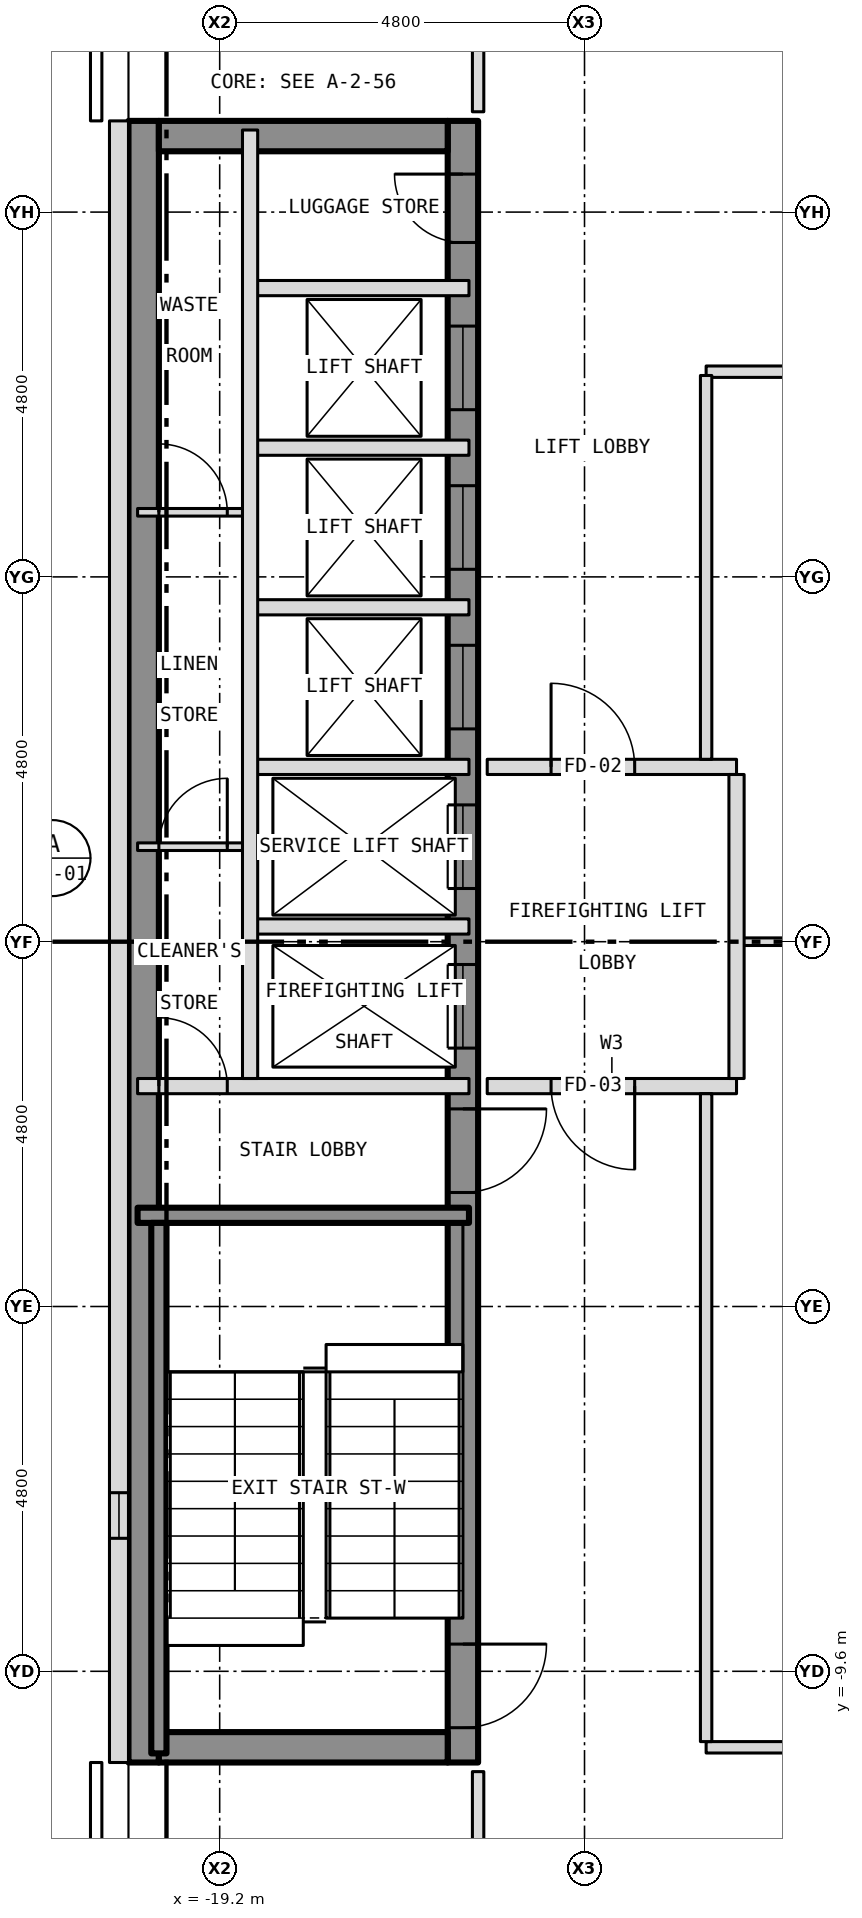
"""IFC4 building model, lengths in metres.
Left out: names, types, materials, properties, quantities, classifications, styles, units other than length and angle.
Written with IfcOpenShell. Run it as: python <this file> out.ifc"""

import sys

from ifc_helpers import new_model, si_unit, direction, frame, frame_2d, origin, place, context, subcontext, project, spatial, rectangle, extrude, element, fill, save


model = new_model("IFC4")
c1 = context("Model", 3, precision=1e-05, world=origin(), true_north=direction((0.0, 1.0)))
c2 = subcontext(c1, "Body", "Model", "MODEL_VIEW")
j1 = project(units=[si_unit("LENGTHUNIT", "METRE"), si_unit("PLANEANGLEUNIT", "RADIAN")], contexts=[c1])
p1 = place(None, origin())
s1 = spatial("IfcSite", under=j1, at=p1, CompositionType="ELEMENT")
p2 = place(p1, origin())
s2 = spatial("IfcBuilding", under=s1, at=p2, CompositionType="ELEMENT")
p3 = place(p2, frame((0.0, 0.0, 205.0)))
s3 = spatial("IfcBuildingStorey", under=s2, at=p3, CompositionType="ELEMENT", Elevation=205.0)
p4 = place(p3, frame((-16.0, -10.8, 0.0), z_axis=(0.0, 0.0, 1.0), x_axis=(0.0, 1.0, 0.0)))
e1 = element("IfcWall", 1, at=p4, inside=s3, PredefinedType="SHEAR", context=c2, shape_type="SweptSolid", body=[
    extrude(rectangle(XDim=21.6, YDim=0.4, at=frame_2d((10.8, 0.0))), origin(), (0.0, 0.0, 1.0), 3.25),
])
p5 = place(p4, frame((9.4, 0.0, 0.0)))
e2 = element("IfcOpeningElement", 2, at=p5, cuts=e1, PredefinedType="OPENING", context=c2, shape_type="SweptSolid", body=[
    extrude(rectangle(XDim=1.1, YDim=2.1, at=frame_2d((0.55, 1.05))), frame((0.0, 0.212, 0.0), z_axis=(0.0, -1.0, 0.0), x_axis=(1.0, 0.0, 0.0)), (0.0, 0.0, 1.0), 0.424),
])
p6 = place(p4, frame((11.5, 0.0, 0.0)))
e3 = element("IfcOpeningElement", 3, at=p6, cuts=e1, PredefinedType="OPENING", context=c2, shape_type="SweptSolid", body=[
    extrude(rectangle(XDim=1.1, YDim=2.1, at=frame_2d((0.55, 1.05))), frame((0.0, 0.212, 0.0), z_axis=(0.0, -1.0, 0.0), x_axis=(1.0, 0.0, 0.0)), (0.0, 0.0, 1.0), 0.424),
])
p7 = place(p4, frame((13.6, 0.0, 0.0)))
e4 = element("IfcOpeningElement", 4, at=p7, cuts=e1, PredefinedType="OPENING", context=c2, shape_type="SweptSolid", body=[
    extrude(rectangle(XDim=1.1, YDim=2.1, at=frame_2d((0.55, 1.05))), frame((0.0, 0.212, 0.0), z_axis=(0.0, -1.0, 0.0), x_axis=(1.0, 0.0, 0.0)), (0.0, 0.0, 1.0), 0.424),
])
p8 = place(p4, frame((15.7, 0.0, 0.0)))
e5 = element("IfcOpeningElement", 5, at=p8, cuts=e1, PredefinedType="OPENING", context=c2, shape_type="SweptSolid", body=[
    extrude(rectangle(XDim=1.1, YDim=2.1, at=frame_2d((0.55, 1.05))), frame((0.0, 0.212, 0.0), z_axis=(0.0, -1.0, 0.0), x_axis=(1.0, 0.0, 0.0)), (0.0, 0.0, 1.0), 0.424),
])
p9 = place(p4, frame((17.8, 0.0, 0.0)))
e6 = element("IfcOpeningElement", 6, at=p9, cuts=e1, PredefinedType="OPENING", context=c2, shape_type="SweptSolid", body=[
    extrude(rectangle(XDim=1.1, YDim=2.1, at=frame_2d((0.55, 1.05))), frame((0.0, 0.212, 0.0), z_axis=(0.0, -1.0, 0.0), x_axis=(1.0, 0.0, 0.0)), (0.0, 0.0, 1.0), 0.424),
])
p10 = place(p4, frame((0.458, 0.0, 0.0)))
e7 = element("IfcOpeningElement", 7, at=p10, cuts=e1, PredefinedType="OPENING", context=c2, shape_type="SweptSolid", body=[
    extrude(rectangle(XDim=1.1, YDim=2.1, at=frame_2d((0.55, 1.05))), frame((0.0, 0.212, 0.0), z_axis=(0.0, -1.0, 0.0), x_axis=(1.0, 0.0, 0.0)), (0.0, 0.0, 1.0), 0.424),
])
p11 = place(p4, frame((7.5, 0.0, 0.0)))
e8 = element("IfcOpeningElement", 8, at=p11, cuts=e1, PredefinedType="OPENING", context=c2, shape_type="SweptSolid", body=[
    extrude(rectangle(XDim=1.1, YDim=2.1, at=frame_2d((0.55, 1.05))), frame((0.0, 0.212, 0.0), z_axis=(0.0, -1.0, 0.0), x_axis=(1.0, 0.0, 0.0)), (0.0, 0.0, 1.0), 0.424),
])
p12 = place(p4, frame((20.0, 0.0, 0.0)))
e9 = element("IfcOpeningElement", 9, at=p12, cuts=e1, PredefinedType="OPENING", context=c2, shape_type="SweptSolid", body=[
    extrude(rectangle(XDim=0.9, YDim=2.1, at=frame_2d((0.45, 1.05))), frame((0.0, 0.212, 0.0), z_axis=(0.0, -1.0, 0.0), x_axis=(1.0, 0.0, 0.0)), (0.0, 0.0, 1.0), 0.424),
])
p13 = place(p3, frame((-20.2, -10.8, 0.0), z_axis=(0.0, 0.0, 1.0), x_axis=(0.0, 1.0, 0.0)))
e10 = element("IfcWall", 10, at=p13, inside=s3, PredefinedType="SHEAR", context=c2, shape_type="SweptSolid", body=[
    extrude(rectangle(XDim=21.6, YDim=0.4, at=frame_2d((10.8, 0.0))), origin(), (0.0, 0.0, 1.0), 3.25),
])
for number, where, z_axis, x_axis in (
    (11, (-20.0, 10.6, 0.0), (0.0, 0.0, 1.0), (1.0, 0.0, 0.0)),
    (12, (-20.0, -10.6, 0.0), (0.0, 0.0, 1.0), (1.0, 0.0, 0.0)),
):
    element("IfcWall", number, at=place(p3, frame(where, z_axis=z_axis, x_axis=x_axis)), inside=s3, PredefinedType="SHEAR", context=c2, shape_type="SweptSolid", body=[
        extrude(rectangle(XDim=3.8, YDim=0.4, at=frame_2d((1.9, 0.0))), origin(), (0.0, 0.0, 1.0), 3.25),
    ])
p14 = place(p3, frame((-20.525, 10.8, 0.0), z_axis=(0.0, 0.0, 1.0), x_axis=(0.0, -1.0, 0.0)))
e13 = element("IfcWall", 13, at=p14, inside=s3, PredefinedType="SOLIDWALL", context=c2, shape_type="SweptSolid", body=[
    extrude(rectangle(XDim=21.6, YDim=0.25, at=frame_2d((10.8, 0.0))), origin(), (0.0, 0.0, 1.0), 3.5),
])
p15 = place(p14, frame((18.05, 0.0, 1.0)))
e14 = element("IfcOpeningElement", 14, at=p15, cuts=e13, PredefinedType="OPENING", context=c2, shape_type="SweptSolid", body=[
    extrude(rectangle(XDim=0.6, YDim=1.5, at=frame_2d((0.3, 0.75))), frame((0.0, 0.137, 0.0), z_axis=(0.0, -1.0, 0.0), x_axis=(1.0, 0.0, 0.0)), (0.0, 0.0, 1.0), 0.274),
])
p16 = place(p3, frame((-12.8, -10.6, 0.0), z_axis=(0.0, 0.0, 1.0), x_axis=(1.0, 0.0, 0.0)))
e15 = element("IfcWall", 15, at=p16, inside=s3, PredefinedType="PARTITIONING", context=c2, shape_type="SweptSolid", body=[
    extrude(rectangle(XDim=16.9, YDim=0.15, at=frame_2d((8.45, 0.0))), origin(), (0.0, 0.0, 1.0), 3.35),
])
p17 = place(p16, frame((5.95, 0.0, 0.0)))
e16 = element("IfcOpeningElement", 16, at=p17, cuts=e15, PredefinedType="OPENING", context=c2, shape_type="SweptSolid", body=[
    extrude(rectangle(XDim=0.9, YDim=2.1, at=frame_2d((0.45, 1.05))), frame((0.0, 0.087, 0.0), z_axis=(0.0, -1.0, 0.0), x_axis=(1.0, 0.0, 0.0)), (0.0, 0.0, 1.0), 0.174),
])
p18 = place(p3, frame((-20.28, -3.6, 0.0), z_axis=(0.0, 0.0, 1.0), x_axis=(1.0, 0.0, 0.0)))
e17 = element("IfcWall", 17, at=p18, inside=s3, PredefinedType="SHEAR", context=c2, shape_type="SweptSolid", body=[
    extrude(rectangle(XDim=4.36, YDim=0.2, at=frame_2d((2.18, 0.0))), origin(), (0.0, 0.0, 1.0), 3.25),
])
p19 = place(p3, frame((-20.28, -1.9, 0.0), z_axis=(0.0, 0.0, 1.0), x_axis=(1.0, 0.0, 0.0)))
e18 = element("IfcWall", 18, at=p19, inside=s3, PredefinedType="PARTITIONING", context=c2, shape_type="SweptSolid", body=[
    extrude(rectangle(XDim=4.36, YDim=0.2, at=frame_2d((2.18, 0.0))), origin(), (0.0, 0.0, 1.0), 3.25),
])
p20 = place(p19, frame((0.28, 0.0, 0.0)))
e19 = element("IfcOpeningElement", 19, at=p20, cuts=e18, PredefinedType="OPENING", context=c2, shape_type="SweptSolid", body=[
    extrude(rectangle(XDim=0.9, YDim=2.1, at=frame_2d((0.45, 1.05))), frame((0.0, 0.112, 0.0), z_axis=(0.0, -1.0, 0.0), x_axis=(1.0, 0.0, 0.0)), (0.0, 0.0, 1.0), 0.224),
])
p21 = place(p3, frame((-15.68, -1.9, 0.0), z_axis=(0.0, 0.0, 1.0), x_axis=(1.0, 0.0, 0.0)))
e20 = element("IfcWall", 20, at=p21, inside=s3, PredefinedType="PARTITIONING", context=c2, shape_type="SweptSolid", body=[
    extrude(rectangle(XDim=3.28, YDim=0.2, at=frame_2d((1.64, 0.0))), origin(), (0.0, 0.0, 1.0), 3.35),
])
p22 = place(p21, frame((0.84, 0.0, 0.0)))
e21 = element("IfcOpeningElement", 21, at=p22, cuts=e20, PredefinedType="OPENING", context=c2, shape_type="SweptSolid", body=[
    extrude(rectangle(XDim=1.1, YDim=2.1, at=frame_2d((0.55, 1.05))), frame((0.0, 0.112, 0.0), z_axis=(0.0, -1.0, 0.0), x_axis=(1.0, 0.0, 0.0)), (0.0, 0.0, 1.0), 0.224),
])
p23 = place(p3, frame((-12.4, 0.0, 0.0), z_axis=(0.0, 0.0, 1.0), x_axis=(1.0, 0.0, 0.0)))
e22 = element("IfcWall", 22, at=p23, inside=s3, PredefinedType="PARTITIONING", context=c2, shape_type="SweptSolid", body=[
    extrude(rectangle(XDim=2.613, YDim=0.1, at=frame_2d((1.306, 0.0))), origin(), (0.0, 0.0, 1.0), 2.728),
])
p24 = place(p3, frame((-18.8, 0.2, 0.0), z_axis=(0.0, 0.0, 1.0), x_axis=(1.0, 0.0, 0.0)))
e23 = element("IfcWall", 23, at=p24, inside=s3, PredefinedType="PARTITIONING", context=c2, shape_type="SweptSolid", body=[
    extrude(rectangle(XDim=2.88, YDim=0.2, at=frame_2d((1.44, 0.0))), origin(), (0.0, 0.0, 1.0), 3.25),
])
p25 = place(p3, frame((-20.28, 1.25, 0.0), z_axis=(0.0, 0.0, 1.0), x_axis=(1.0, 0.0, 0.0)))
e24 = element("IfcWall", 24, at=p25, inside=s3, PredefinedType="PARTITIONING", context=c2, shape_type="SweptSolid", body=[
    extrude(rectangle(XDim=1.48, YDim=0.1, at=frame_2d((0.74, 0.0))), origin(), (0.0, 0.0, 1.0), 3.25),
])
p26 = place(p25, frame((0.28, 0.0, 0.0)))
e25 = element("IfcOpeningElement", 25, at=p26, cuts=e24, PredefinedType="OPENING", context=c2, shape_type="SweptSolid", body=[
    extrude(rectangle(XDim=0.9, YDim=2.1, at=frame_2d((0.45, 1.05))), frame((0.0, 0.062, 0.0), z_axis=(0.0, -1.0, 0.0), x_axis=(1.0, 0.0, 0.0)), (0.0, 0.0, 1.0), 0.124),
])
p27 = place(p3, frame((-18.8, 2.3, 0.0), z_axis=(0.0, 0.0, 1.0), x_axis=(1.0, 0.0, 0.0)))
e26 = element("IfcWall", 26, at=p27, inside=s3, PredefinedType="PARTITIONING", context=c2, shape_type="SweptSolid", body=[
    extrude(rectangle(XDim=2.88, YDim=0.2, at=frame_2d((1.44, 0.0))), origin(), (0.0, 0.0, 1.0), 3.25),
])
p28 = place(p3, frame((-15.68, 2.3, 0.0), z_axis=(0.0, 0.0, 1.0), x_axis=(1.0, 0.0, 0.0)))
e27 = element("IfcWall", 27, at=p28, inside=s3, PredefinedType="PARTITIONING", context=c2, shape_type="SweptSolid", body=[
    extrude(rectangle(XDim=3.28, YDim=0.2, at=frame_2d((1.64, 0.0))), origin(), (0.0, 0.0, 1.0), 3.35),
])
p29 = place(p28, frame((0.84, 0.0, 0.0)))
e28 = element("IfcOpeningElement", 28, at=p29, cuts=e27, PredefinedType="OPENING", context=c2, shape_type="SweptSolid", body=[
    extrude(rectangle(XDim=1.1, YDim=2.1, at=frame_2d((0.55, 1.05))), frame((0.0, 0.112, 0.0), z_axis=(0.0, -1.0, 0.0), x_axis=(1.0, 0.0, 0.0)), (0.0, 0.0, 1.0), 0.224),
])
p30 = place(p3, frame((-18.8, 4.4, 0.0), z_axis=(0.0, 0.0, 1.0), x_axis=(1.0, 0.0, 0.0)))
e29 = element("IfcWall", 29, at=p30, inside=s3, PredefinedType="PARTITIONING", context=c2, shape_type="SweptSolid", body=[
    extrude(rectangle(XDim=2.88, YDim=0.2, at=frame_2d((1.44, 0.0))), origin(), (0.0, 0.0, 1.0), 3.25),
])
p31 = place(p3, frame((-20.28, 5.65, 0.0), z_axis=(0.0, 0.0, 1.0), x_axis=(1.0, 0.0, 0.0)))
e30 = element("IfcWall", 30, at=p31, inside=s3, PredefinedType="PARTITIONING", context=c2, shape_type="SweptSolid", body=[
    extrude(rectangle(XDim=1.48, YDim=0.1, at=frame_2d((0.74, 0.0))), origin(), (0.0, 0.0, 1.0), 3.25),
])
p32 = place(p31, frame((0.28, 0.0, 0.0)))
e31 = element("IfcOpeningElement", 31, at=p32, cuts=e30, PredefinedType="OPENING", context=c2, shape_type="SweptSolid", body=[
    extrude(rectangle(XDim=0.9, YDim=2.1, at=frame_2d((0.45, 1.05))), frame((0.0, 0.062, 0.0), z_axis=(0.0, -1.0, 0.0), x_axis=(1.0, 0.0, 0.0)), (0.0, 0.0, 1.0), 0.124),
])
p33 = place(p3, frame((-18.8, 6.5, 0.0), z_axis=(0.0, 0.0, 1.0), x_axis=(1.0, 0.0, 0.0)))
e32 = element("IfcWall", 32, at=p33, inside=s3, PredefinedType="PARTITIONING", context=c2, shape_type="SweptSolid", body=[
    extrude(rectangle(XDim=2.88, YDim=0.2, at=frame_2d((1.44, 0.0))), origin(), (0.0, 0.0, 1.0), 3.25),
])
p34 = place(p3, frame((-12.8, 7.5, 0.0), z_axis=(0.0, 0.0, 1.0), x_axis=(1.0, 0.0, 0.0)))
e33 = element("IfcWall", 33, at=p34, inside=s3, PredefinedType="PARTITIONING", context=c2, shape_type="SweptSolid", body=[
    extrude(rectangle(XDim=16.9, YDim=0.15, at=frame_2d((8.45, 0.0))), origin(), (0.0, 0.0, 1.0), 3.35),
])
p35 = place(p34, frame((14.4, 0.0, 0.0)))
e34 = element("IfcOpeningElement", 34, at=p35, cuts=e33, PredefinedType="OPENING", context=c2, shape_type="SweptSolid", body=[
    extrude(rectangle(XDim=0.9, YDim=2.1, at=frame_2d((0.45, 1.05))), frame((0.0, 0.087, 0.0), z_axis=(0.0, -1.0, 0.0), x_axis=(1.0, 0.0, 0.0)), (0.0, 0.0, 1.0), 0.174),
])
p36 = place(p34, frame((5.95, 0.0, 0.0)))
e35 = element("IfcOpeningElement", 35, at=p36, cuts=e33, PredefinedType="OPENING", context=c2, shape_type="SweptSolid", body=[
    extrude(rectangle(XDim=0.9, YDim=2.1, at=frame_2d((0.45, 1.05))), frame((0.0, 0.087, 0.0), z_axis=(0.0, -1.0, 0.0), x_axis=(1.0, 0.0, 0.0)), (0.0, 0.0, 1.0), 0.174),
])
p37 = place(p3, frame((-18.8, 8.6, 0.0), z_axis=(0.0, 0.0, 1.0), x_axis=(1.0, 0.0, 0.0)))
e36 = element("IfcWall", 36, at=p37, inside=s3, PredefinedType="PARTITIONING", context=c2, shape_type="SweptSolid", body=[
    extrude(rectangle(XDim=2.88, YDim=0.2, at=frame_2d((1.44, 0.0))), origin(), (0.0, 0.0, 1.0), 3.25),
])
p38 = place(p3, frame((-20.0, -10.68, 0.0), z_axis=(0.0, 0.0, 1.0), x_axis=(0.0, 1.0, 0.0)))
e37 = element("IfcWall", 37, at=p38, inside=s3, PredefinedType="SHEAR", context=c2, shape_type="SweptSolid", body=[
    extrude(rectangle(XDim=6.98, YDim=0.2, at=frame_2d((3.49, 0.0))), origin(), (0.0, 0.0, 1.0), 3.25),
])
p39 = place(p3, frame((-18.8, -1.8, 0.0), z_axis=(0.0, 0.0, 1.0), x_axis=(0.0, 1.0, 0.0)))
e38 = element("IfcWall", 38, at=p39, inside=s3, PredefinedType="PARTITIONING", context=c2, shape_type="SweptSolid", body=[
    extrude(rectangle(XDim=12.48, YDim=0.2, at=frame_2d((6.24, 0.0))), origin(), (0.0, 0.0, 1.0), 3.25),
])
for number, where, z_axis, x_axis in (
    (39, (-15.8, -12.725, 0.0), (0.0, 0.0, 1.0), (0.0, 1.0, 0.0)),
    (40, (-15.8, 10.92, 0.0), (0.0, 0.0, 1.0), (0.0, 1.0, 0.0)),
):
    element("IfcWall", number, at=place(p3, frame(where, z_axis=z_axis, x_axis=x_axis)), inside=s3, PredefinedType="PARTITIONING", context=c2, shape_type="SweptSolid", body=[
        extrude(rectangle(XDim=1.805, YDim=0.15, at=frame_2d((0.903, 0.0))), origin(), (0.0, 0.0, 1.0), 3.35),
    ])
p40 = place(p3, frame((-12.8, -10.525, 0.0), z_axis=(0.0, 0.0, 1.0), x_axis=(0.0, 1.0, 0.0)))
e41 = element("IfcWall", 41, at=p40, inside=s3, PredefinedType="PARTITIONING", context=c2, shape_type="SweptSolid", body=[
    extrude(rectangle(XDim=8.525, YDim=0.15, at=frame_2d((4.262, 0.0))), origin(), (0.0, 0.0, 1.0), 3.35),
])
p41 = place(p3, frame((-12.8, 2.4, 0.0), z_axis=(0.0, 0.0, 1.0), x_axis=(0.0, 1.0, 0.0)))
e42 = element("IfcWall", 42, at=p41, inside=s3, PredefinedType="PARTITIONING", context=c2, shape_type="SweptSolid", body=[
    extrude(rectangle(XDim=5.05, YDim=0.15, at=frame_2d((2.525, 0.0))), origin(), (0.0, 0.0, 1.0), 3.35),
])
p42 = place(p3, frame((-12.4, -1.8, 0.0), z_axis=(0.0, 0.0, 1.0), x_axis=(0.0, 1.0, 0.0)))
e43 = element("IfcWall", 43, at=p42, inside=s3, PredefinedType="PARTITIONING", context=c2, shape_type="SweptSolid", body=[
    extrude(rectangle(XDim=4.0, YDim=0.2, at=frame_2d((2.0, 0.0))), origin(), (0.0, 0.0, 1.0), 3.35),
])
p43 = place(p15, origin())
e44 = element("IfcWindow", 44, at=p43, inside=s3, PartitioningType="SINGLE_PANEL", PredefinedType="WINDOW", context=c2, shape_type="SweptSolid", body=[
    extrude(rectangle(XDim=0.6, YDim=1.5, at=frame_2d((0.3, 0.75))), frame((0.0, -0.035, 0.0), z_axis=(0.0, -1.0, 0.0), x_axis=(1.0, 0.0, 0.0)), (0.0, 0.0, 1.0), 0.06),
])
fill(e14, e44)
p44 = place(p5, origin())
e45 = element("IfcDoor", 45, at=p44, inside=s3, OperationType="SLIDING_TO_LEFT", PredefinedType="DOOR", context=c2, shape_type="SweptSolid", body=[
    extrude(rectangle(XDim=1.1, YDim=2.1, at=frame_2d((0.55, 1.05))), frame((0.0, 0.025, 0.0), z_axis=(0.0, -1.0, 0.0), x_axis=(1.0, 0.0, 0.0)), (0.0, 0.0, 1.0), 0.05),
])
fill(e2, e45)
p45 = place(p6, origin())
e46 = element("IfcDoor", 46, at=p45, inside=s3, OperationType="SLIDING_TO_LEFT", PredefinedType="DOOR", context=c2, shape_type="SweptSolid", body=[
    extrude(rectangle(XDim=1.1, YDim=2.1, at=frame_2d((0.55, 1.05))), frame((0.0, 0.025, 0.0), z_axis=(0.0, -1.0, 0.0), x_axis=(1.0, 0.0, 0.0)), (0.0, 0.0, 1.0), 0.05),
])
fill(e3, e46)
p46 = place(p7, origin())
e47 = element("IfcDoor", 47, at=p46, inside=s3, OperationType="SLIDING_TO_LEFT", PredefinedType="DOOR", context=c2, shape_type="SweptSolid", body=[
    extrude(rectangle(XDim=1.1, YDim=2.1, at=frame_2d((0.55, 1.05))), frame((0.0, 0.025, 0.0), z_axis=(0.0, -1.0, 0.0), x_axis=(1.0, 0.0, 0.0)), (0.0, 0.0, 1.0), 0.05),
])
fill(e4, e47)
p47 = place(p8, origin())
e48 = element("IfcDoor", 48, at=p47, inside=s3, OperationType="SLIDING_TO_LEFT", PredefinedType="DOOR", context=c2, shape_type="SweptSolid", body=[
    extrude(rectangle(XDim=1.1, YDim=2.1, at=frame_2d((0.55, 1.05))), frame((0.0, 0.025, 0.0), z_axis=(0.0, -1.0, 0.0), x_axis=(1.0, 0.0, 0.0)), (0.0, 0.0, 1.0), 0.05),
])
fill(e5, e48)
p48 = place(p9, origin())
e49 = element("IfcDoor", 49, at=p48, inside=s3, OperationType="SLIDING_TO_LEFT", PredefinedType="DOOR", context=c2, shape_type="SweptSolid", body=[
    extrude(rectangle(XDim=1.1, YDim=2.1, at=frame_2d((0.55, 1.05))), frame((0.0, 0.025, 0.0), z_axis=(0.0, -1.0, 0.0), x_axis=(1.0, 0.0, 0.0)), (0.0, 0.0, 1.0), 0.05),
])
fill(e6, e49)
p49 = place(p10, origin())
e50 = element("IfcDoor", 50, at=p49, inside=s3, OperationType="SINGLE_SWING_RIGHT", PredefinedType="DOOR", context=c2, shape_type="SweptSolid", body=[
    extrude(rectangle(XDim=1.1, YDim=2.1, at=frame_2d((0.55, 1.05))), frame((0.0, 0.025, 0.0), z_axis=(0.0, -1.0, 0.0), x_axis=(1.0, 0.0, 0.0)), (0.0, 0.0, 1.0), 0.05),
])
fill(e7, e50)
p50 = place(p11, origin())
e51 = element("IfcDoor", 51, at=p50, inside=s3, OperationType="SINGLE_SWING_RIGHT", PredefinedType="DOOR", context=c2, shape_type="SweptSolid", body=[
    extrude(rectangle(XDim=1.1, YDim=2.1, at=frame_2d((0.55, 1.05))), frame((0.0, 0.025, 0.0), z_axis=(0.0, -1.0, 0.0), x_axis=(1.0, 0.0, 0.0)), (0.0, 0.0, 1.0), 0.05),
])
fill(e8, e51)
p51 = place(p12, origin())
e52 = element("IfcDoor", 52, at=p51, inside=s3, OperationType="SINGLE_SWING_RIGHT", PredefinedType="DOOR", context=c2, shape_type="SweptSolid", body=[
    extrude(rectangle(XDim=0.9, YDim=2.1, at=frame_2d((0.45, 1.05))), frame((0.0, 0.025, 0.0), z_axis=(0.0, -1.0, 0.0), x_axis=(1.0, 0.0, 0.0)), (0.0, 0.0, 1.0), 0.05),
])
fill(e9, e52)
p52 = place(p20, origin())
e53 = element("IfcDoor", 53, at=p52, inside=s3, OperationType="SINGLE_SWING_LEFT", PredefinedType="DOOR", context=c2, shape_type="SweptSolid", body=[
    extrude(rectangle(XDim=0.9, YDim=2.1, at=frame_2d((0.45, 1.05))), frame((0.0, 0.025, 0.0), z_axis=(0.0, -1.0, 0.0), x_axis=(1.0, 0.0, 0.0)), (0.0, 0.0, 1.0), 0.05),
])
fill(e19, e53)
p53 = place(p26, origin())
e54 = element("IfcDoor", 54, at=p53, inside=s3, OperationType="SINGLE_SWING_RIGHT", PredefinedType="DOOR", context=c2, shape_type="SweptSolid", body=[
    extrude(rectangle(XDim=0.9, YDim=2.1, at=frame_2d((0.45, 1.05))), frame((0.0, 0.025, 0.0), z_axis=(0.0, -1.0, 0.0), x_axis=(1.0, 0.0, 0.0)), (0.0, 0.0, 1.0), 0.05),
])
fill(e25, e54)
p54 = place(p32, origin())
e55 = element("IfcDoor", 55, at=p54, inside=s3, OperationType="SINGLE_SWING_LEFT", PredefinedType="DOOR", context=c2, shape_type="SweptSolid", body=[
    extrude(rectangle(XDim=0.9, YDim=2.1, at=frame_2d((0.45, 1.05))), frame((0.0, 0.025, 0.0), z_axis=(0.0, -1.0, 0.0), x_axis=(1.0, 0.0, 0.0)), (0.0, 0.0, 1.0), 0.05),
])
fill(e31, e55)
p55 = place(p29, origin())
e56 = element("IfcDoor", 56, at=p55, inside=s3, OperationType="SINGLE_SWING_LEFT", PredefinedType="DOOR", context=c2, shape_type="SweptSolid", body=[
    extrude(rectangle(XDim=1.1, YDim=2.1, at=frame_2d((0.55, 1.05))), frame((0.0, 0.025, 0.0), z_axis=(0.0, -1.0, 0.0), x_axis=(1.0, 0.0, 0.0)), (0.0, 0.0, 1.0), 0.05),
])
fill(e28, e56)
p56 = place(p22, origin())
e57 = element("IfcDoor", 57, at=p56, inside=s3, OperationType="SINGLE_SWING_RIGHT", PredefinedType="DOOR", context=c2, shape_type="SweptSolid", body=[
    extrude(rectangle(XDim=1.1, YDim=2.1, at=frame_2d((0.55, 1.05))), frame((0.0, 0.025, 0.0), z_axis=(0.0, -1.0, 0.0), x_axis=(1.0, 0.0, 0.0)), (0.0, 0.0, 1.0), 0.05),
])
fill(e21, e57)
save(model, sys.argv[1])
